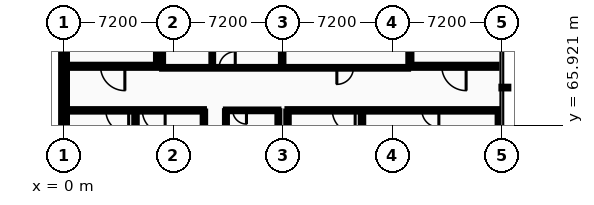
"""IFC4 building model, lengths in metres.
Left out: names, types, materials, properties, quantities, classifications, styles, units other than length and angle.
Written with IfcOpenShell. Run it as: python <this file> out.ifc"""

import sys

from ifc_helpers import new_model, si_unit, direction, frame, frame_2d, origin, place, context, subcontext, project, spatial, rectangle, extrude, element, fill, save


model = new_model("IFC4")
c1 = context("Model", 3, precision=1e-05, world=origin(), true_north=direction((0.0, 1.0)))
c2 = subcontext(c1, "Body", "Model", "MODEL_VIEW")
j1 = project(units=[si_unit("LENGTHUNIT", "METRE"), si_unit("PLANEANGLEUNIT", "RADIAN")], contexts=[c1])
p1 = place(None, origin())
s1 = spatial("IfcSite", under=j1, at=p1, CompositionType="ELEMENT")
p2 = place(p1, origin())
s2 = spatial("IfcBuilding", under=s1, at=p2, CompositionType="ELEMENT")
p3 = place(p2, frame((0.0, 0.0, 5.2)))
s3 = spatial("IfcBuildingStorey", under=s2, at=p3, CompositionType="ELEMENT", Elevation=5.2)
p4 = place(p3, frame((0.0, 72.0, 0.0), z_axis=(0.0, 0.0, 1.0), x_axis=(0.0, -1.0, 0.0)))
e1 = element("IfcWall", 1, at=p4, inside=s3, PredefinedType="STANDARD", context=c2, shape_type="SweptSolid", body=[
    extrude(rectangle(XDim=7.2, YDim=0.38, at=frame_2d((3.6, 0.0))), origin(), (0.0, 0.0, 1.0), 3.81),
])
p5 = place(p3, frame((0.35, 69.8, 0.0), z_axis=(0.0, 0.0, 1.0), x_axis=(1.0, 0.0, 0.0)))
e2 = element("IfcWall", 2, at=p5, inside=s3, PredefinedType="PARTITIONING", context=c2, shape_type="SweptSolid", body=[
    extrude(rectangle(XDim=5.7, YDim=0.2, at=frame_2d((2.85, 0.0))), origin(), (0.0, 0.0, 1.0), 4.185),
])
p6 = place(p5, frame((2.05, 0.0, 0.0)))
e3 = element("IfcOpeningElement", 3, at=p6, cuts=e2, PredefinedType="OPENING", context=c2, shape_type="SweptSolid", body=[
    extrude(rectangle(XDim=1.6, YDim=2.2, at=frame_2d((0.8, 1.1))), frame((0.0, 0.11, 0.0), z_axis=(0.0, -1.0, 0.0), x_axis=(1.0, 0.0, 0.0)), (0.0, 0.0, 1.0), 0.22),
])
p7 = place(p3, frame((6.15, 69.9, 0.0), z_axis=(0.0, 0.0, 1.0), x_axis=(0.0, 1.0, 0.0)))
e4 = element("IfcWall", 4, at=p7, inside=s3, PredefinedType="PARTITIONING", context=c2, shape_type="SweptSolid", body=[
    extrude(rectangle(XDim=3.2, YDim=0.2, at=frame_2d((1.6, 0.0))), origin(), (0.0, 0.0, 1.0), 4.185),
])
p8 = place(p3, frame((22.85, 69.8, 0.0), z_axis=(0.0, 0.0, 1.0), x_axis=(1.0, 0.0, 0.0)))
e5 = element("IfcWall", 5, at=p8, inside=s3, PredefinedType="PARTITIONING", context=c2, shape_type="SweptSolid", body=[
    extrude(rectangle(XDim=5.6, YDim=0.2, at=frame_2d((2.8, 0.0))), origin(), (0.0, 0.0, 1.0), 4.185),
])
p9 = place(p8, frame((2.0, 0.0, 0.0)))
e6 = element("IfcOpeningElement", 6, at=p9, cuts=e5, PredefinedType="OPENING", context=c2, shape_type="SweptSolid", body=[
    extrude(rectangle(XDim=1.6, YDim=2.2, at=frame_2d((0.8, 1.1))), frame((0.0, 0.11, 0.0), z_axis=(0.0, -1.0, 0.0), x_axis=(1.0, 0.0, 0.0)), (0.0, 0.0, 1.0), 0.22),
])
p10 = place(p3, frame((22.75, 69.9, 0.0), z_axis=(0.0, 0.0, 1.0), x_axis=(0.0, 1.0, 0.0)))
e7 = element("IfcWall", 7, at=p10, inside=s3, PredefinedType="PARTITIONING", context=c2, shape_type="SweptSolid", body=[
    extrude(rectangle(XDim=3.2, YDim=0.2, at=frame_2d((1.6, 0.0))), origin(), (0.0, 0.0, 1.0), 4.185),
])
p11 = place(p3, frame((0.2, 66.9, 0.0), z_axis=(0.0, 0.0, 1.0), x_axis=(1.0, 0.0, 0.0)))
e8 = element("IfcWall", 8, at=p11, inside=s3, PredefinedType="PARTITIONING", context=c2, shape_type="SweptSolid", body=[
    extrude(rectangle(XDim=9.0, YDim=0.158, at=frame_2d((4.5, 0.0))), origin(), (0.0, 0.0, 1.0), 4.185),
])
p12 = place(p11, frame((4.95, 0.0, 0.0)))
e9 = element("IfcOpeningElement", 9, at=p12, cuts=e8, PredefinedType="OPENING", context=c2, shape_type="SweptSolid", body=[
    extrude(rectangle(XDim=1.5, YDim=2.2, at=frame_2d((0.75, 1.1))), frame((0.0, 0.089, 0.0), z_axis=(0.0, -1.0, 0.0), x_axis=(1.0, 0.0, 0.0)), (0.0, 0.0, 1.0), 0.178),
])
p13 = place(p11, frame((2.55, 0.0, 0.0)))
e10 = element("IfcOpeningElement", 10, at=p13, cuts=e8, PredefinedType="OPENING", context=c2, shape_type="SweptSolid", body=[
    extrude(rectangle(XDim=1.5, YDim=2.2, at=frame_2d((0.75, 1.1))), frame((0.0, 0.089, 0.0), z_axis=(0.0, -1.0, 0.0), x_axis=(1.0, 0.0, 0.0)), (0.0, 0.0, 1.0), 0.178),
])
p14 = place(p3, frame((10.65, 66.9, 0.0), z_axis=(0.0, 0.0, 1.0), x_axis=(1.0, 0.0, 0.0)))
e11 = element("IfcWall", 11, at=p14, inside=s3, PredefinedType="PARTITIONING", context=c2, shape_type="SweptSolid", body=[
    extrude(rectangle(XDim=3.45, YDim=0.11, at=frame_2d((1.725, 0.0))), origin(), (0.0, 0.0, 1.0), 4.185),
])
p15 = place(p14, frame((0.45, 0.0, 0.0)))
e12 = element("IfcOpeningElement", 12, at=p15, cuts=e11, PredefinedType="OPENING", context=c2, shape_type="SweptSolid", body=[
    extrude(rectangle(XDim=0.9, YDim=2.1, at=frame_2d((0.45, 1.05))), frame((0.0, 0.065, 0.0), z_axis=(0.0, -1.0, 0.0), x_axis=(1.0, 0.0, 0.0)), (0.0, 0.0, 1.0), 0.13),
])
p16 = place(p3, frame((14.7, 66.9, 0.0), z_axis=(0.0, 0.0, 1.0), x_axis=(1.0, 0.0, 0.0)))
e13 = element("IfcWall", 13, at=p16, inside=s3, PredefinedType="PARTITIONING", context=c2, shape_type="SweptSolid", body=[
    extrude(rectangle(XDim=13.9, YDim=0.158, at=frame_2d((6.95, 0.0))), origin(), (0.0, 0.0, 1.0), 4.185),
])
p17 = place(p16, frame((2.95, 0.0, 0.0)))
e14 = element("IfcOpeningElement", 14, at=p17, cuts=e13, PredefinedType="OPENING", context=c2, shape_type="SweptSolid", body=[
    extrude(rectangle(XDim=1.5, YDim=2.2, at=frame_2d((0.75, 1.1))), frame((0.0, 0.089, 0.0), z_axis=(0.0, -1.0, 0.0), x_axis=(1.0, 0.0, 0.0)), (0.0, 0.0, 1.0), 0.178),
])
p18 = place(p16, frame((8.843, 0.0, 0.0)))
e15 = element("IfcOpeningElement", 15, at=p18, cuts=e13, PredefinedType="OPENING", context=c2, shape_type="SweptSolid", body=[
    extrude(rectangle(XDim=1.114, YDim=2.124, at=frame_2d((0.557, 1.062))), frame((0.0, 0.089, 0.0), z_axis=(0.0, -1.0, 0.0), x_axis=(1.0, 0.0, 0.0)), (0.0, 0.0, 1.0), 0.178),
])
p19 = place(p3, frame((6.45, 69.7, 0.0), z_axis=(0.0, 0.0, 1.0), x_axis=(1.0, 0.0, 0.0)))
e16 = element("IfcWall", 16, at=p19, inside=s3, PredefinedType="PARTITIONING", context=c2, shape_type="SweptSolid", body=[
    extrude(rectangle(XDim=16.18, YDim=0.11, at=frame_2d((8.09, 0.0))), origin(), (0.0, 0.0, 1.0), 4.185),
])
p20 = place(p19, frame((1.85, 0.0, 0.0)))
e17 = element("IfcOpeningElement", 17, at=p20, cuts=e16, PredefinedType="OPENING", context=c2, shape_type="SweptSolid", body=[
    extrude(rectangle(XDim=1.0, YDim=2.1, at=frame_2d((0.5, 1.05))), frame((0.0, 0.065, 0.0), z_axis=(0.0, -1.0, 0.0), x_axis=(1.0, 0.0, 0.0)), (0.0, 0.0, 1.0), 0.13),
])
p21 = place(p19, frame((3.75, 0.0, 0.0)))
e18 = element("IfcOpeningElement", 18, at=p21, cuts=e16, PredefinedType="OPENING", context=c2, shape_type="SweptSolid", body=[
    extrude(rectangle(XDim=1.062, YDim=2.124, at=frame_2d((0.531, 1.062))), frame((0.0, 0.065, 0.0), z_axis=(0.0, -1.0, 0.0), x_axis=(1.0, 0.0, 0.0)), (0.0, 0.0, 1.0), 0.13),
])
p22 = place(p19, frame((11.496, 0.0, 0.0)))
e19 = element("IfcOpeningElement", 19, at=p22, cuts=e16, PredefinedType="OPENING", context=c2, shape_type="SweptSolid", body=[
    extrude(rectangle(XDim=1.088, YDim=2.124, at=frame_2d((0.544, 1.062))), frame((0.0, 0.065, 0.0), z_axis=(0.0, -1.0, 0.0), x_axis=(1.0, 0.0, 0.0)), (0.0, 0.0, 1.0), 0.13),
])
p23 = place(p3, frame((4.7, 51.32, 0.0), z_axis=(0.0, 0.0, 1.0), x_axis=(0.0, 1.0, 0.0)))
e20 = element("IfcWall", 20, at=p23, inside=s3, PredefinedType="PARTITIONING", context=c2, shape_type="SweptSolid", body=[
    extrude(rectangle(XDim=15.501, YDim=0.158, at=frame_2d((7.75, 0.0))), origin(), (0.0, 0.0, 1.0), 3.9),
])
p24 = place(p3, frame((6.45, 69.755, 0.0), z_axis=(0.0, 0.0, 1.0), x_axis=(0.0, 1.0, 0.0)))
e21 = element("IfcWall", 21, at=p24, inside=s3, PredefinedType="PARTITIONING", context=c2, shape_type="SweptSolid", body=[
    extrude(rectangle(XDim=3.17, YDim=0.125, at=frame_2d((1.585, 0.0))), origin(), (0.0, 0.0, 1.0), 4.185),
])
p25 = place(p3, frame((9.2, 60.96, 0.0), z_axis=(0.0, 0.0, 1.0), x_axis=(0.0, 1.0, 0.0)))
e22 = element("IfcWall", 22, at=p25, inside=s3, PredefinedType="PARTITIONING", context=c2, shape_type="SweptSolid", body=[
    extrude(rectangle(XDim=5.861, YDim=0.158, at=frame_2d((2.931, 0.0))), origin(), (0.0, 0.0, 1.0), 4.185),
])
p26 = place(p3, frame((9.75, 69.755, 0.0), z_axis=(0.0, 0.0, 1.0), x_axis=(0.0, 1.0, 0.0)))
e23 = element("IfcWall", 23, at=p26, inside=s3, PredefinedType="PARTITIONING", context=c2, shape_type="SweptSolid", body=[
    extrude(rectangle(XDim=12.045, YDim=0.11, at=frame_2d((6.022, 0.0))), origin(), (0.0, 0.0, 1.0), 3.9),
])
p27 = place(p3, frame((10.65, 60.96, 0.0), z_axis=(0.0, 0.0, 1.0), x_axis=(0.0, 1.0, 0.0)))
e24 = element("IfcWall", 24, at=p27, inside=s3, PredefinedType="PARTITIONING", context=c2, shape_type="SweptSolid", body=[
    extrude(rectangle(XDim=5.885, YDim=0.125, at=frame_2d((2.942, 0.0))), origin(), (0.0, 0.0, 1.0), 4.185),
])
p28 = place(p3, frame((14.1, 65.18, 0.0), z_axis=(0.0, 0.0, 1.0), x_axis=(0.0, 1.0, 0.0)))
e25 = element("IfcWall", 25, at=p28, inside=s3, PredefinedType="PARTITIONING", context=c2, shape_type="SweptSolid", body=[
    extrude(rectangle(XDim=1.665, YDim=0.125, at=frame_2d((0.833, 0.0))), origin(), (0.0, 0.0, 1.0), 4.185),
])
p29 = place(p3, frame((14.35, 69.755, 0.0), z_axis=(0.0, 0.0, 1.0), x_axis=(0.0, 1.0, 0.0)))
e26 = element("IfcWall", 26, at=p29, inside=s3, PredefinedType="PARTITIONING", context=c2, shape_type="SweptSolid", body=[
    extrude(rectangle(XDim=1.865, YDim=0.16, at=frame_2d((0.933, 0.0))), origin(), (0.0, 0.0, 1.0), 3.88),
])
p30 = place(p3, frame((14.7, 65.18, 0.0), z_axis=(0.0, 0.0, 1.0), x_axis=(0.0, 1.0, 0.0)))
e27 = element("IfcWall", 27, at=p30, inside=s3, PredefinedType="PARTITIONING", context=c2, shape_type="SweptSolid", body=[
    extrude(rectangle(XDim=1.641, YDim=0.158, at=frame_2d((0.821, 0.0))), origin(), (0.0, 0.0, 1.0), 3.88),
])
p31 = place(p3, frame((19.6, 51.32, 0.0), z_axis=(0.0, 0.0, 1.0), x_axis=(0.0, 1.0, 0.0)))
e28 = element("IfcWall", 28, at=p31, inside=s3, PredefinedType="PARTITIONING", context=c2, shape_type="SweptSolid", body=[
    extrude(rectangle(XDim=15.501, YDim=0.158, at=frame_2d((7.75, 0.0))), origin(), (0.0, 0.0, 1.0), 4.185),
])
p32 = place(p3, frame((28.6, 65.18, 0.0), z_axis=(0.0, 0.0, 1.0), x_axis=(0.0, 1.0, 0.0)))
e29 = element("IfcWall", 29, at=p32, inside=s3, PredefinedType="PARTITIONING", context=c2, shape_type="SweptSolid", body=[
    extrude(rectangle(XDim=1.641, YDim=0.15, at=frame_2d((0.821, 0.0))), origin(), (0.0, 0.0, 1.0), 3.81),
])
p33 = place(p6, origin())
e30 = element("IfcDoor", 30, at=p33, inside=s3, OperationType="DOUBLE_DOOR_SINGLE_SWING", PredefinedType="DOOR", context=c2, shape_type="SweptSolid", body=[
    extrude(rectangle(XDim=1.6, YDim=2.2, at=frame_2d((0.8, 1.1))), frame((0.0, 0.025, 0.0), z_axis=(0.0, -1.0, 0.0), x_axis=(1.0, 0.0, 0.0)), (0.0, 0.0, 1.0), 0.05),
])
fill(e3, e30)
p34 = place(p9, origin())
e31 = element("IfcDoor", 31, at=p34, inside=s3, OperationType="DOUBLE_DOOR_SINGLE_SWING", PredefinedType="DOOR", context=c2, shape_type="SweptSolid", body=[
    extrude(rectangle(XDim=1.6, YDim=2.2, at=frame_2d((0.8, 1.1))), frame((0.0, 0.025, 0.0), z_axis=(0.0, -1.0, 0.0), x_axis=(1.0, 0.0, 0.0)), (0.0, 0.0, 1.0), 0.05),
])
fill(e6, e31)
p35 = place(p20, frame((1.0, 0.0, 0.0), z_axis=(0.0, 0.0, 1.0), x_axis=(-1.0, 0.0, 0.0)))
e32 = element("IfcDoor", 32, at=p35, inside=s3, OperationType="SLIDING_TO_LEFT", PredefinedType="DOOR", context=c2, shape_type="SweptSolid", body=[
    extrude(rectangle(XDim=1.0, YDim=2.1, at=frame_2d((0.5, 1.05))), frame((0.0, 0.025, 0.0), z_axis=(0.0, -1.0, 0.0), x_axis=(1.0, 0.0, 0.0)), (0.0, 0.0, 1.0), 0.05),
])
fill(e17, e32)
p36 = place(p15, origin())
e33 = element("IfcDoor", 33, at=p36, inside=s3, OperationType="SINGLE_SWING_RIGHT", PredefinedType="DOOR", context=c2, shape_type="SweptSolid", body=[
    extrude(rectangle(XDim=0.9, YDim=2.1, at=frame_2d((0.45, 1.05))), frame((0.0, 0.025, 0.0), z_axis=(0.0, -1.0, 0.0), x_axis=(1.0, 0.0, 0.0)), (0.0, 0.0, 1.0), 0.05),
])
fill(e12, e33)
p37 = place(p21, frame((1.062, 0.0, 0.0), z_axis=(0.0, 0.0, 1.0), x_axis=(-1.0, 0.0, 0.0)))
e34 = element("IfcDoor", 34, at=p37, inside=s3, OperationType="SINGLE_SWING_RIGHT", PredefinedType="DOOR", context=c2, shape_type="SweptSolid", body=[
    extrude(rectangle(XDim=1.062, YDim=2.124, at=frame_2d((0.531, 1.062))), frame((0.0, 0.025, 0.0), z_axis=(0.0, -1.0, 0.0), x_axis=(1.0, 0.0, 0.0)), (0.0, 0.0, 1.0), 0.05),
])
fill(e18, e34)
p38 = place(p12, origin())
e35 = element("IfcDoor", 35, at=p38, inside=s3, OperationType="DOUBLE_DOOR_SINGLE_SWING", PredefinedType="DOOR", context=c2, shape_type="SweptSolid", body=[
    extrude(rectangle(XDim=1.5, YDim=2.2, at=frame_2d((0.75, 1.1))), frame((0.0, 0.025, 0.0), z_axis=(0.0, -1.0, 0.0), x_axis=(1.0, 0.0, 0.0)), (0.0, 0.0, 1.0), 0.05),
])
fill(e9, e35)
p39 = place(p13, origin())
e36 = element("IfcDoor", 36, at=p39, inside=s3, OperationType="DOUBLE_DOOR_SINGLE_SWING", PredefinedType="DOOR", context=c2, shape_type="SweptSolid", body=[
    extrude(rectangle(XDim=1.5, YDim=2.2, at=frame_2d((0.75, 1.1))), frame((0.0, 0.025, 0.0), z_axis=(0.0, -1.0, 0.0), x_axis=(1.0, 0.0, 0.0)), (0.0, 0.0, 1.0), 0.05),
])
fill(e10, e36)
p40 = place(p17, origin())
e37 = element("IfcDoor", 37, at=p40, inside=s3, OperationType="DOUBLE_DOOR_SINGLE_SWING", PredefinedType="DOOR", context=c2, shape_type="SweptSolid", body=[
    extrude(rectangle(XDim=1.5, YDim=2.2, at=frame_2d((0.75, 1.1))), frame((0.0, 0.025, 0.0), z_axis=(0.0, -1.0, 0.0), x_axis=(1.0, 0.0, 0.0)), (0.0, 0.0, 1.0), 0.05),
])
fill(e14, e37)
p41 = place(p22, frame((1.088, 0.0, 0.0), z_axis=(0.0, 0.0, 1.0), x_axis=(-1.0, 0.0, 0.0)))
e38 = element("IfcDoor", 38, at=p41, inside=s3, OperationType="SINGLE_SWING_LEFT", PredefinedType="DOOR", context=c2, shape_type="SweptSolid", body=[
    extrude(rectangle(XDim=1.088, YDim=2.124, at=frame_2d((0.544, 1.062))), frame((0.0, 0.025, 0.0), z_axis=(0.0, -1.0, 0.0), x_axis=(1.0, 0.0, 0.0)), (0.0, 0.0, 1.0), 0.05),
])
fill(e19, e38)
p42 = place(p18, origin())
e39 = element("IfcDoor", 39, at=p42, inside=s3, OperationType="SINGLE_SWING_RIGHT", PredefinedType="DOOR", context=c2, shape_type="SweptSolid", body=[
    extrude(rectangle(XDim=1.114, YDim=2.124, at=frame_2d((0.557, 1.062))), frame((0.0, 0.025, 0.0), z_axis=(0.0, -1.0, 0.0), x_axis=(1.0, 0.0, 0.0)), (0.0, 0.0, 1.0), 0.05),
])
fill(e15, e39)
save(model, sys.argv[1])
